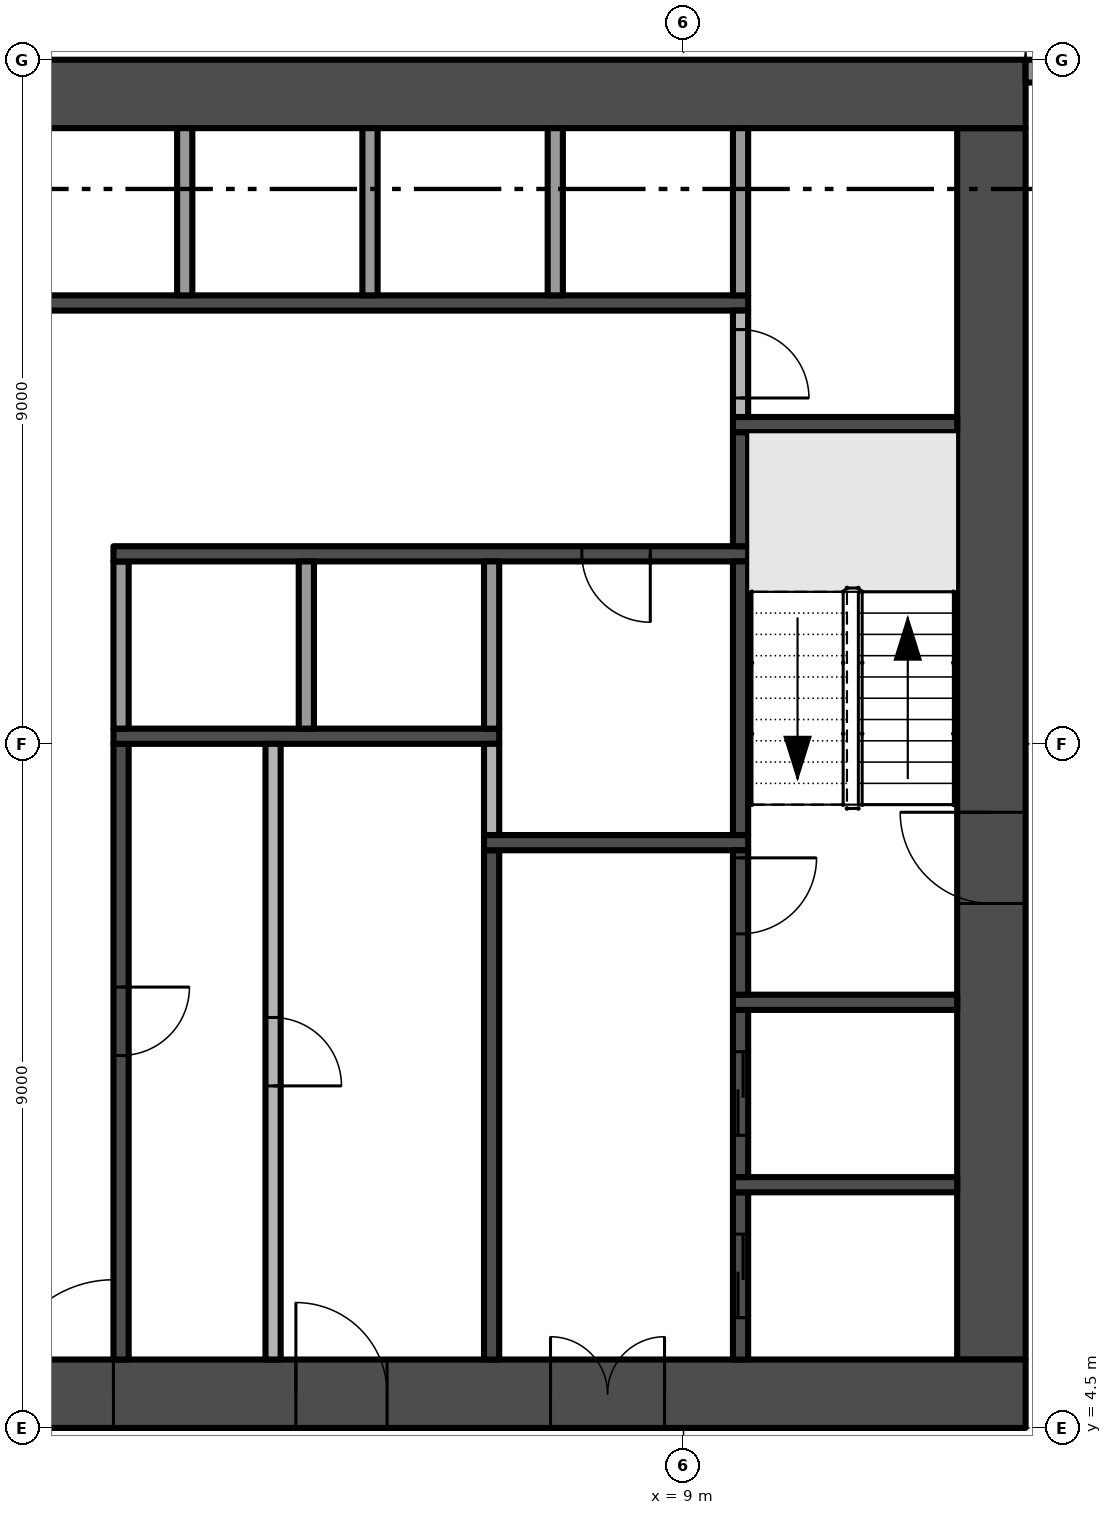
"""IFC4 building model, lengths in metres.
Left out: names, types, materials, properties, quantities, classifications, styles, units other than length and angle.
Written with IfcOpenShell. Run it as: python <this file> out.ifc"""

import sys

from ifc_helpers import new_model, si_unit, direction, frame, frame_2d, origin, place, context, subcontext, project, spatial, rectangle, extrude, element, fill, save


model = new_model("IFC4")
c1 = context("Model", 3, precision=1e-05, world=origin(), true_north=direction((0.0, 1.0)))
c2 = subcontext(c1, "Body", "Model", "MODEL_VIEW")
j1 = project(units=[si_unit("LENGTHUNIT", "METRE"), si_unit("PLANEANGLEUNIT", "RADIAN")], contexts=[c1])
p1 = place(None, origin())
s1 = spatial("IfcSite", under=j1, at=p1, CompositionType="ELEMENT")
p2 = place(p1, origin())
s2 = spatial("IfcBuilding", under=s1, at=p2, CompositionType="ELEMENT")
p3 = place(p2, frame((0.0, 0.0, 107.4)))
s3 = spatial("IfcBuildingStorey", under=s2, at=p3, CompositionType="ELEMENT", Elevation=107.4)
p4 = place(p3, frame((-13.5, 4.95, -0.3), z_axis=(0.0, 0.0, 1.0), x_axis=(1.0, 0.0, 0.0)))
e1 = element("IfcWall", 1, at=p4, inside=s3, PredefinedType="SHEAR", context=c2, shape_type="SweptSolid", body=[
    extrude(rectangle(XDim=27.0, YDim=0.9, at=frame_2d((13.5, 0.0))), origin(), (0.0, 0.0, 1.0), 3.8),
])
p5 = place(p4, frame((12.0, 0.0, 0.3)))
e2 = element("IfcOpeningElement", 2, at=p5, cuts=e1, PredefinedType="OPENING", context=c2, shape_type="SweptSolid", body=[
    extrude(rectangle(XDim=3.0, YDim=2.4, at=frame_2d((1.5, 1.2))), frame((0.0, 0.46, 0.0), z_axis=(0.0, -1.0, 0.0), x_axis=(1.0, 0.0, 0.0)), (0.0, 0.0, 1.0), 0.92),
])
p6 = place(p4, frame((4.9, 0.0, 0.3)))
e3 = element("IfcOpeningElement", 3, at=p6, cuts=e1, PredefinedType="OPENING", context=c2, shape_type="SweptSolid", body=[
    extrude(rectangle(XDim=1.2, YDim=2.2, at=frame_2d((0.6, 1.1))), frame((0.0, 0.46, 0.0), z_axis=(0.0, -1.0, 0.0), x_axis=(1.0, 0.0, 0.0)), (0.0, 0.0, 1.0), 0.92),
])
p7 = place(p4, frame((20.75, 0.0, 0.3)))
e4 = element("IfcOpeningElement", 4, at=p7, cuts=e1, PredefinedType="OPENING", context=c2, shape_type="SweptSolid", body=[
    extrude(rectangle(XDim=1.5, YDim=2.2, at=frame_2d((0.75, 1.1))), frame((0.0, 0.46, 0.0), z_axis=(0.0, -1.0, 0.0), x_axis=(1.0, 0.0, 0.0)), (0.0, 0.0, 1.0), 0.92),
])
p8 = place(p4, frame((17.4, 0.0, 0.3)))
e5 = element("IfcOpeningElement", 5, at=p8, cuts=e1, PredefinedType="OPENING", context=c2, shape_type="SweptSolid", body=[
    extrude(rectangle(XDim=1.2, YDim=2.2, at=frame_2d((0.6, 1.1))), frame((0.0, 0.46, 0.0), z_axis=(0.0, -1.0, 0.0), x_axis=(1.0, 0.0, 0.0)), (0.0, 0.0, 1.0), 0.92),
])
p9 = place(p3, frame((13.05, 5.4, -0.3), z_axis=(0.0, 0.0, 1.0), x_axis=(0.0, 1.0, 0.0)))
e6 = element("IfcWall", 6, at=p9, inside=s3, PredefinedType="SHEAR", context=c2, shape_type="SweptSolid", body=[
    extrude(rectangle(XDim=16.2, YDim=0.9, at=frame_2d((8.1, 0.0))), origin(), (0.0, 0.0, 1.0), 3.8),
])
p10 = place(p9, frame((6.0, 0.0, 0.3)))
e7 = element("IfcOpeningElement", 7, at=p10, cuts=e6, PredefinedType="OPENING", context=c2, shape_type="SweptSolid", body=[
    extrude(rectangle(XDim=1.2, YDim=2.2, at=frame_2d((0.6, 1.1))), frame((0.0, 0.46, 0.0), z_axis=(0.0, -1.0, 0.0), x_axis=(1.0, 0.0, 0.0)), (0.0, 0.0, 1.0), 0.92),
])
p11 = place(p3, frame((13.5, 22.05, -0.3), z_axis=(0.0, 0.0, 1.0), x_axis=(-1.0, 0.0, 0.0)))
e8 = element("IfcWall", 8, at=p11, inside=s3, PredefinedType="SHEAR", context=c2, shape_type="SweptSolid", body=[
    extrude(rectangle(XDim=27.0, YDim=0.9, at=frame_2d((13.5, 0.0))), origin(), (0.0, 0.0, 1.0), 3.8),
])
p12 = place(p3, frame((13.5, 22.35, 0.0), z_axis=(0.0, 0.0, 1.0), x_axis=(1.0, 0.0, 0.0)))
e9 = element("IfcWall", 9, at=p12, inside=s3, PredefinedType="SOLIDWALL", context=c2, shape_type="SweptSolid", body=[
    extrude(rectangle(XDim=3.875, YDim=0.3, at=frame_2d((1.938, 0.0))), origin(), (0.0, 0.0, 1.0), 3.5),
])
p13 = place(p12, frame((0.775, 0.0, 0.45)))
e10 = element("IfcOpeningElement", 10, at=p13, cuts=e9, PredefinedType="OPENING", context=c2, shape_type="SweptSolid", body=[
    extrude(rectangle(XDim=2.775, YDim=2.65, at=frame_2d((1.387, 1.325))), frame((0.0, 0.16, 0.0), z_axis=(0.0, -1.0, 0.0), x_axis=(1.0, 0.0, 0.0)), (0.0, 0.0, 1.0), 0.32),
])
p14 = place(p3, frame((-9.85, 19.3, 0.0), z_axis=(0.0, 0.0, 1.0), x_axis=(1.0, 0.0, 0.0)))
e11 = element("IfcWall", 11, at=p14, inside=s3, PredefinedType="SHEAR", context=c2, shape_type="SweptSolid", body=[
    extrude(rectangle(XDim=19.7, YDim=0.2, at=frame_2d((9.85, 0.0))), origin(), (0.0, 0.0, 1.0), 3.5),
])
p15 = place(p14, frame((0.769, 0.0, 0.0)))
e12 = element("IfcOpeningElement", 12, at=p15, cuts=e11, PredefinedType="OPENING", context=c2, shape_type="SweptSolid", body=[
    extrude(rectangle(XDim=1.1, YDim=2.1, at=frame_2d((0.55, 1.05))), frame((0.0, 0.11, 0.0), z_axis=(0.0, -1.0, 0.0), x_axis=(1.0, 0.0, 0.0)), (0.0, 0.0, 1.0), 0.22),
])
p16 = place(p14, frame((3.206, 0.0, 0.0)))
e13 = element("IfcOpeningElement", 13, at=p16, cuts=e11, PredefinedType="OPENING", context=c2, shape_type="SweptSolid", body=[
    extrude(rectangle(XDim=1.1, YDim=2.1, at=frame_2d((0.55, 1.05))), frame((0.0, 0.11, 0.0), z_axis=(0.0, -1.0, 0.0), x_axis=(1.0, 0.0, 0.0)), (0.0, 0.0, 1.0), 0.22),
])
p17 = place(p14, frame((5.644, 0.0, 0.0)))
e14 = element("IfcOpeningElement", 14, at=p17, cuts=e11, PredefinedType="OPENING", context=c2, shape_type="SweptSolid", body=[
    extrude(rectangle(XDim=1.1, YDim=2.1, at=frame_2d((0.55, 1.05))), frame((0.0, 0.11, 0.0), z_axis=(0.0, -1.0, 0.0), x_axis=(1.0, 0.0, 0.0)), (0.0, 0.0, 1.0), 0.22),
])
p18 = place(p14, frame((8.081, 0.0, 0.0)))
e15 = element("IfcOpeningElement", 15, at=p18, cuts=e11, PredefinedType="OPENING", context=c2, shape_type="SweptSolid", body=[
    extrude(rectangle(XDim=1.1, YDim=2.1, at=frame_2d((0.55, 1.05))), frame((0.0, 0.11, 0.0), z_axis=(0.0, -1.0, 0.0), x_axis=(1.0, 0.0, 0.0)), (0.0, 0.0, 1.0), 0.22),
])
p19 = place(p3, frame((1.6, 13.5, 0.0), z_axis=(0.0, 0.0, 1.0), x_axis=(0.0, -1.0, 0.0)))
e16 = element("IfcWall", 16, at=p19, inside=s3, PredefinedType="SHEAR", context=c2, shape_type="SweptSolid", body=[
    extrude(rectangle(XDim=8.1, YDim=0.2, at=frame_2d((4.05, 0.0))), origin(), (0.0, 0.0, 1.0), 3.5),
])
p20 = place(p19, frame((3.2, 0.0, 0.0)))
e17 = element("IfcOpeningElement", 17, at=p20, cuts=e16, PredefinedType="OPENING", context=c2, shape_type="SweptSolid", body=[
    extrude(rectangle(XDim=0.9, YDim=2.1, at=frame_2d((0.45, 1.05))), frame((0.0, 0.11, 0.0), z_axis=(0.0, -1.0, 0.0), x_axis=(1.0, 0.0, 0.0)), (0.0, 0.0, 1.0), 0.22),
])
p21 = place(p3, frame((1.5, 13.6, 0.0), z_axis=(0.0, 0.0, 1.0), x_axis=(1.0, 0.0, 0.0)))
e18 = element("IfcWall", 18, at=p21, inside=s3, PredefinedType="SHEAR", context=c2, shape_type="SweptSolid", body=[
    extrude(rectangle(XDim=5.075, YDim=0.2, at=frame_2d((2.538, 0.0))), origin(), (0.0, 0.0, 1.0), 3.5),
])
p22 = place(p3, frame((1.6, 13.7, 0.0), z_axis=(0.0, 0.0, 1.0), x_axis=(0.0, 1.0, 0.0)))
e19 = element("IfcWall", 19, at=p22, inside=s3, PredefinedType="PARTITIONING", context=c2, shape_type="SweptSolid", body=[
    extrude(rectangle(XDim=2.2, YDim=0.2, at=frame_2d((1.1, 0.0))), origin(), (0.0, 0.0, 1.0), 3.5),
])
p23 = place(p3, frame((9.85, 16.0, 0.0), z_axis=(0.0, 0.0, 1.0), x_axis=(-1.0, 0.0, 0.0)))
e20 = element("IfcWall", 20, at=p23, inside=s3, PredefinedType="SHEAR", context=c2, shape_type="SweptSolid", body=[
    extrude(rectangle(XDim=8.35, YDim=0.2, at=frame_2d((4.175, 0.0))), origin(), (0.0, 0.0, 1.0), 3.5),
])
p24 = place(p23, frame((1.288, 0.0, 0.0)))
e21 = element("IfcOpeningElement", 21, at=p24, cuts=e20, PredefinedType="OPENING", context=c2, shape_type="SweptSolid", body=[
    extrude(rectangle(XDim=0.9, YDim=2.1, at=frame_2d((0.45, 1.05))), frame((0.0, 0.11, 0.0), z_axis=(0.0, -1.0, 0.0), x_axis=(1.0, 0.0, 0.0)), (0.0, 0.0, 1.0), 0.22),
])
p25 = place(p3, frame((2.438, 19.4, 0.0), z_axis=(0.0, 0.0, 1.0), x_axis=(0.0, 1.0, 0.0)))
e22 = element("IfcWall", 22, at=p25, inside=s3, PredefinedType="PARTITIONING", context=c2, shape_type="SweptSolid", body=[
    extrude(rectangle(XDim=2.2, YDim=0.2, at=frame_2d((1.1, 0.0))), origin(), (0.0, 0.0, 1.0), 3.5),
])
p26 = place(p3, frame((3.6, 13.5, 0.0), z_axis=(0.0, 0.0, 1.0), x_axis=(0.0, -1.0, 0.0)))
e23 = element("IfcWall", 23, at=p26, inside=s3, PredefinedType="PARTITIONING", context=c2, shape_type="SweptSolid", body=[
    extrude(rectangle(XDim=8.1, YDim=0.2, at=frame_2d((4.05, 0.0))), origin(), (0.0, 0.0, 1.0), 3.5),
])
p27 = place(p26, frame((3.6, 0.0, 0.0)))
e24 = element("IfcOpeningElement", 24, at=p27, cuts=e23, PredefinedType="OPENING", context=c2, shape_type="SweptSolid", body=[
    extrude(rectangle(XDim=0.9, YDim=2.1, at=frame_2d((0.45, 1.05))), frame((0.0, 0.11, 0.0), z_axis=(0.0, -1.0, 0.0), x_axis=(1.0, 0.0, 0.0)), (0.0, 0.0, 1.0), 0.22),
])
for number, where, z_axis, x_axis in (
    (25, (4.037, 13.7, 0.0), (0.0, 0.0, 1.0), (0.0, 1.0, 0.0)),
    (26, (4.875, 19.4, 0.0), (0.0, 0.0, 1.0), (0.0, 1.0, 0.0)),
):
    element("IfcWall", number, at=place(p3, frame(where, z_axis=z_axis, x_axis=x_axis)), inside=s3, PredefinedType="PARTITIONING", context=c2, shape_type="SweptSolid", body=[
        extrude(rectangle(XDim=2.2, YDim=0.2, at=frame_2d((1.1, 0.0))), origin(), (0.0, 0.0, 1.0), 3.5),
    ])
p28 = place(p3, frame((6.475, 5.4, 0.0), z_axis=(0.0, 0.0, 1.0), x_axis=(0.0, 1.0, 0.0)))
e27 = element("IfcWall", 27, at=p28, inside=s3, PredefinedType="SHEAR", context=c2, shape_type="SweptSolid", body=[
    extrude(rectangle(XDim=6.7, YDim=0.2, at=frame_2d((3.35, 0.0))), origin(), (0.0, 0.0, 1.0), 3.5),
])
p29 = place(p3, frame((6.375, 12.2, 0.0), z_axis=(0.0, 0.0, 1.0), x_axis=(1.0, 0.0, 0.0)))
e28 = element("IfcWall", 28, at=p29, inside=s3, PredefinedType="SHEAR", context=c2, shape_type="SweptSolid", body=[
    extrude(rectangle(XDim=3.475, YDim=0.2, at=frame_2d((1.738, 0.0))), origin(), (0.0, 0.0, 1.0), 3.5),
])
p30 = place(p3, frame((6.475, 12.3, 0.0), z_axis=(0.0, 0.0, 1.0), x_axis=(0.0, 1.0, 0.0)))
e29 = element("IfcWall", 29, at=p30, inside=s3, PredefinedType="PARTITIONING", context=c2, shape_type="SweptSolid", body=[
    extrude(rectangle(XDim=1.2, YDim=0.2, at=frame_2d((0.6, 0.0))), origin(), (0.0, 0.0, 1.0), 3.5),
])
for number, where, z_axis, x_axis in (
    (30, (6.475, 13.7, 0.0), (0.0, 0.0, 1.0), (0.0, 1.0, 0.0)),
    (31, (7.312, 19.4, 0.0), (0.0, 0.0, 1.0), (0.0, 1.0, 0.0)),
):
    element("IfcWall", number, at=place(p3, frame(where, z_axis=z_axis, x_axis=x_axis)), inside=s3, PredefinedType="PARTITIONING", context=c2, shape_type="SweptSolid", body=[
        extrude(rectangle(XDim=2.2, YDim=0.2, at=frame_2d((1.1, 0.0))), origin(), (0.0, 0.0, 1.0), 3.5),
    ])
p31 = place(p3, frame((9.75, 5.4, 0.0), z_axis=(0.0, 0.0, 1.0), x_axis=(0.0, 1.0, 0.0)))
e32 = element("IfcWall", 32, at=p31, inside=s3, PredefinedType="SHEAR", context=c2, shape_type="SweptSolid", body=[
    extrude(rectangle(XDim=2.2, YDim=0.2, at=frame_2d((1.1, 0.0))), origin(), (0.0, 0.0, 1.0), 3.5),
])
p32 = place(p31, frame((0.55, 0.0, 0.0)))
e33 = element("IfcOpeningElement", 33, at=p32, cuts=e32, PredefinedType="OPENING", context=c2, shape_type="SweptSolid", body=[
    extrude(rectangle(XDim=1.1, YDim=2.1, at=frame_2d((0.55, 1.05))), frame((0.0, 0.11, 0.0), z_axis=(0.0, -1.0, 0.0), x_axis=(1.0, 0.0, 0.0)), (0.0, 0.0, 1.0), 0.22),
])
p33 = place(p3, frame((9.65, 7.7, 0.0), z_axis=(0.0, 0.0, 1.0), x_axis=(1.0, 0.0, 0.0)))
e34 = element("IfcWall", 34, at=p33, inside=s3, PredefinedType="SHEAR", context=c2, shape_type="SweptSolid", body=[
    extrude(rectangle(XDim=2.95, YDim=0.2, at=frame_2d((1.475, 0.0))), origin(), (0.0, 0.0, 1.0), 3.5),
])
p34 = place(p3, frame((9.75, 7.8, 0.0), z_axis=(0.0, 0.0, 1.0), x_axis=(0.0, 1.0, 0.0)))
e35 = element("IfcWall", 35, at=p34, inside=s3, PredefinedType="SHEAR", context=c2, shape_type="SweptSolid", body=[
    extrude(rectangle(XDim=2.2, YDim=0.2, at=frame_2d((1.1, 0.0))), origin(), (0.0, 0.0, 1.0), 3.5),
])
p35 = place(p34, frame((0.55, 0.0, 0.0)))
e36 = element("IfcOpeningElement", 36, at=p35, cuts=e35, PredefinedType="OPENING", context=c2, shape_type="SweptSolid", body=[
    extrude(rectangle(XDim=1.1, YDim=2.1, at=frame_2d((0.55, 1.05))), frame((0.0, 0.11, 0.0), z_axis=(0.0, -1.0, 0.0), x_axis=(1.0, 0.0, 0.0)), (0.0, 0.0, 1.0), 0.22),
])
p36 = place(p3, frame((9.65, 10.1, 0.0), z_axis=(0.0, 0.0, 1.0), x_axis=(1.0, 0.0, 0.0)))
e37 = element("IfcWall", 37, at=p36, inside=s3, PredefinedType="SHEAR", context=c2, shape_type="SweptSolid", body=[
    extrude(rectangle(XDim=2.95, YDim=0.2, at=frame_2d((1.475, 0.0))), origin(), (0.0, 0.0, 1.0), 3.5),
])
p37 = place(p3, frame((9.75, 12.1, 0.0), z_axis=(0.0, 0.0, 1.0), x_axis=(0.0, -1.0, 0.0)))
e38 = element("IfcWall", 38, at=p37, inside=s3, PredefinedType="SHEAR", context=c2, shape_type="SweptSolid", body=[
    extrude(rectangle(XDim=1.9, YDim=0.2, at=frame_2d((0.95, 0.0))), origin(), (0.0, 0.0, 1.0), 3.5),
])
p38 = place(p37, frame((0.1, 0.0, 0.0)))
e39 = element("IfcOpeningElement", 39, at=p38, cuts=e38, PredefinedType="OPENING", context=c2, shape_type="SweptSolid", body=[
    extrude(rectangle(XDim=1.0, YDim=2.2, at=frame_2d((0.5, 1.1))), frame((0.0, 0.11, 0.0), z_axis=(0.0, -1.0, 0.0), x_axis=(1.0, 0.0, 0.0)), (0.0, 0.0, 1.0), 0.22),
])
p39 = place(p3, frame((9.75, 12.3, 0.0), z_axis=(0.0, 0.0, 1.0), x_axis=(0.0, 1.0, 0.0)))
e40 = element("IfcWall", 40, at=p39, inside=s3, PredefinedType="SHEAR", context=c2, shape_type="SweptSolid", body=[
    extrude(rectangle(XDim=3.6, YDim=0.2, at=frame_2d((1.8, 0.0))), origin(), (0.0, 0.0, 1.0), 3.5),
])
p40 = place(p3, frame((9.75, 16.1, 0.0), z_axis=(0.0, 0.0, 1.0), x_axis=(0.0, 1.0, 0.0)))
e41 = element("IfcWall", 41, at=p40, inside=s3, PredefinedType="SHEAR", context=c2, shape_type="SweptSolid", body=[
    extrude(rectangle(XDim=1.5, YDim=0.2, at=frame_2d((0.75, 0.0))), origin(), (0.0, 0.0, 1.0), 3.5),
])
p41 = place(p3, frame((9.65, 17.7, 0.0), z_axis=(0.0, 0.0, 1.0), x_axis=(1.0, 0.0, 0.0)))
e42 = element("IfcWall", 42, at=p41, inside=s3, PredefinedType="SHEAR", context=c2, shape_type="SweptSolid", body=[
    extrude(rectangle(XDim=2.95, YDim=0.2, at=frame_2d((1.475, 0.0))), origin(), (0.0, 0.0, 1.0), 3.5),
])
p42 = place(p3, frame((9.75, 19.2, 0.0), z_axis=(0.0, 0.0, 1.0), x_axis=(0.0, -1.0, 0.0)))
e43 = element("IfcWall", 43, at=p42, inside=s3, PredefinedType="PARTITIONING", context=c2, shape_type="SweptSolid", body=[
    extrude(rectangle(XDim=1.4, YDim=0.2, at=frame_2d((0.7, 0.0))), origin(), (0.0, 0.0, 1.0), 3.5),
])
p43 = place(p42, frame((0.25, 0.0, 0.0)))
e44 = element("IfcOpeningElement", 44, at=p43, cuts=e43, PredefinedType="OPENING", context=c2, shape_type="SweptSolid", body=[
    extrude(rectangle(XDim=0.9, YDim=2.1, at=frame_2d((0.45, 1.05))), frame((0.0, 0.11, 0.0), z_axis=(0.0, -1.0, 0.0), x_axis=(1.0, 0.0, 0.0)), (0.0, 0.0, 1.0), 0.22),
])
p44 = place(p3, frame((9.75, 19.4, 0.0), z_axis=(0.0, 0.0, 1.0), x_axis=(0.0, 1.0, 0.0)))
e45 = element("IfcWall", 45, at=p44, inside=s3, PredefinedType="PARTITIONING", context=c2, shape_type="SweptSolid", body=[
    extrude(rectangle(XDim=2.2, YDim=0.2, at=frame_2d((1.1, 0.0))), origin(), (0.0, 0.0, 1.0), 3.5),
])
p45 = place(p5, frame((3.0, 0.0, 0.0), z_axis=(0.0, 0.0, 1.0), x_axis=(-1.0, 0.0, 0.0)))
e46 = element("IfcDoor", 46, at=p45, inside=s3, OperationType="DOUBLE_DOOR_SINGLE_SWING", PredefinedType="DOOR", context=c2, shape_type="SweptSolid", body=[
    extrude(rectangle(XDim=3.0, YDim=2.4, at=frame_2d((1.5, 1.2))), frame((0.0, 0.025, 0.0), z_axis=(0.0, -1.0, 0.0), x_axis=(1.0, 0.0, 0.0)), (0.0, 0.0, 1.0), 0.05),
])
fill(e2, e46)
p46 = place(p10, frame((1.2, 0.0, 0.0), z_axis=(0.0, 0.0, 1.0), x_axis=(-1.0, 0.0, 0.0)))
e47 = element("IfcDoor", 47, at=p46, inside=s3, OperationType="SINGLE_SWING_LEFT", PredefinedType="DOOR", context=c2, shape_type="SweptSolid", body=[
    extrude(rectangle(XDim=1.2, YDim=2.2, at=frame_2d((0.6, 1.1))), frame((0.0, 0.025, 0.0), z_axis=(0.0, -1.0, 0.0), x_axis=(1.0, 0.0, 0.0)), (0.0, 0.0, 1.0), 0.05),
])
fill(e7, e47)
p47 = place(p7, frame((1.5, 0.0, 0.0), z_axis=(0.0, 0.0, 1.0), x_axis=(-1.0, 0.0, 0.0)))
e48 = element("IfcDoor", 48, at=p47, inside=s3, OperationType="DOUBLE_DOOR_SINGLE_SWING", PredefinedType="DOOR", context=c2, shape_type="SweptSolid", body=[
    extrude(rectangle(XDim=1.5, YDim=2.2, at=frame_2d((0.75, 1.1))), frame((0.0, 0.025, 0.0), z_axis=(0.0, -1.0, 0.0), x_axis=(1.0, 0.0, 0.0)), (0.0, 0.0, 1.0), 0.05),
])
fill(e4, e48)
p48 = place(p8, frame((1.2, 0.0, 0.0), z_axis=(0.0, 0.0, 1.0), x_axis=(-1.0, 0.0, 0.0)))
e49 = element("IfcDoor", 49, at=p48, inside=s3, OperationType="SINGLE_SWING_RIGHT", PredefinedType="DOOR", context=c2, shape_type="SweptSolid", body=[
    extrude(rectangle(XDim=1.2, YDim=2.2, at=frame_2d((0.6, 1.1))), frame((0.0, 0.025, 0.0), z_axis=(0.0, -1.0, 0.0), x_axis=(1.0, 0.0, 0.0)), (0.0, 0.0, 1.0), 0.05),
])
fill(e5, e49)
p49 = place(p38, origin())
e50 = element("IfcDoor", 50, at=p49, inside=s3, OperationType="SINGLE_SWING_LEFT", PredefinedType="DOOR", context=c2, shape_type="SweptSolid", body=[
    extrude(rectangle(XDim=1.0, YDim=2.2, at=frame_2d((0.5, 1.1))), frame((0.0, 0.025, 0.0), z_axis=(0.0, -1.0, 0.0), x_axis=(1.0, 0.0, 0.0)), (0.0, 0.0, 1.0), 0.05),
])
fill(e39, e50)
p50 = place(p32, origin())
e51 = element("IfcDoor", 51, at=p50, inside=s3, OperationType="SLIDING_TO_RIGHT", PredefinedType="DOOR", context=c2, shape_type="SweptSolid", body=[
    extrude(rectangle(XDim=1.1, YDim=2.1, at=frame_2d((0.55, 1.05))), frame((0.0, 0.025, 0.0), z_axis=(0.0, -1.0, 0.0), x_axis=(1.0, 0.0, 0.0)), (0.0, 0.0, 1.0), 0.05),
])
fill(e33, e51)
p51 = place(p35, origin())
e52 = element("IfcDoor", 52, at=p51, inside=s3, OperationType="SLIDING_TO_RIGHT", PredefinedType="DOOR", context=c2, shape_type="SweptSolid", body=[
    extrude(rectangle(XDim=1.1, YDim=2.1, at=frame_2d((0.55, 1.05))), frame((0.0, 0.025, 0.0), z_axis=(0.0, -1.0, 0.0), x_axis=(1.0, 0.0, 0.0)), (0.0, 0.0, 1.0), 0.05),
])
fill(e36, e52)
p52 = place(p20, origin())
e53 = element("IfcDoor", 53, at=p52, inside=s3, OperationType="SINGLE_SWING_LEFT", PredefinedType="DOOR", context=c2, shape_type="SweptSolid", body=[
    extrude(rectangle(XDim=0.9, YDim=2.1, at=frame_2d((0.45, 1.05))), frame((0.0, 0.025, 0.0), z_axis=(0.0, -1.0, 0.0), x_axis=(1.0, 0.0, 0.0)), (0.0, 0.0, 1.0), 0.05),
])
fill(e17, e53)
p53 = place(p24, origin())
e54 = element("IfcDoor", 54, at=p53, inside=s3, OperationType="SINGLE_SWING_LEFT", PredefinedType="DOOR", context=c2, shape_type="SweptSolid", body=[
    extrude(rectangle(XDim=0.9, YDim=2.1, at=frame_2d((0.45, 1.05))), frame((0.0, 0.025, 0.0), z_axis=(0.0, -1.0, 0.0), x_axis=(1.0, 0.0, 0.0)), (0.0, 0.0, 1.0), 0.05),
])
fill(e21, e54)
p54 = place(p43, origin())
e55 = element("IfcDoor", 55, at=p54, inside=s3, OperationType="SINGLE_SWING_RIGHT", PredefinedType="DOOR", context=c2, shape_type="SweptSolid", body=[
    extrude(rectangle(XDim=0.9, YDim=2.1, at=frame_2d((0.45, 1.05))), frame((0.0, 0.025, 0.0), z_axis=(0.0, -1.0, 0.0), x_axis=(1.0, 0.0, 0.0)), (0.0, 0.0, 1.0), 0.05),
])
fill(e44, e55)
p55 = place(p27, origin())
e56 = element("IfcDoor", 56, at=p55, inside=s3, OperationType="SINGLE_SWING_RIGHT", PredefinedType="DOOR", context=c2, shape_type="SweptSolid", body=[
    extrude(rectangle(XDim=0.9, YDim=2.1, at=frame_2d((0.45, 1.05))), frame((0.0, 0.025, 0.0), z_axis=(0.0, -1.0, 0.0), x_axis=(1.0, 0.0, 0.0)), (0.0, 0.0, 1.0), 0.05),
])
fill(e24, e56)
save(model, sys.argv[1])
